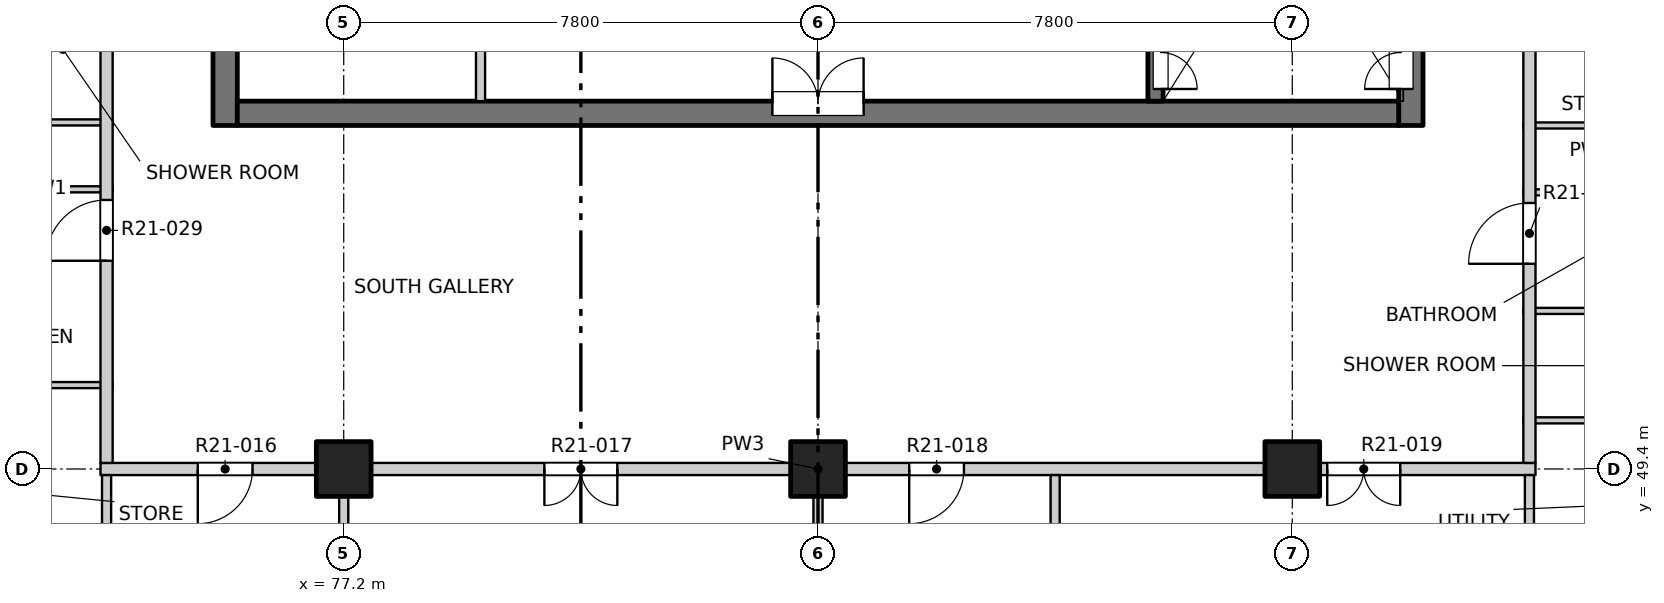
"""IFC4 building model, lengths in metres.
Left out: names, types, materials, properties, quantities, classifications, styles, units other than length and angle.
Written with IfcOpenShell. Run it as: python <this file> out.ifc"""

import sys

from ifc_helpers import new_model, si_unit, direction, frame, frame_2d, origin, origin_2d, place, context, subcontext, project, spatial, rectangle, extrude, element, fill, save


model = new_model("IFC4")
c1 = context("Model", 3, precision=1e-05, world=origin(), true_north=direction((0.0, 1.0)))
c2 = subcontext(c1, "Body", "Model", "MODEL_VIEW")
j1 = project(units=[si_unit("LENGTHUNIT", "METRE"), si_unit("PLANEANGLEUNIT", "RADIAN")], contexts=[c1])
p1 = place(None, origin())
s1 = spatial("IfcSite", under=j1, at=p1, CompositionType="ELEMENT")
p2 = place(p1, origin())
s2 = spatial("IfcBuilding", under=s1, at=p2, CompositionType="ELEMENT")
p3 = place(p2, frame((0.0, 0.0, 214.3)))
s3 = spatial("IfcBuildingStorey", under=s2, at=p3, CompositionType="ELEMENT", Elevation=214.3)
for number, where, z_axis, x_axis in (
    (1, (77.2, 49.4, -0.25), (0.0, 0.0, 1.0), (1.0, 0.0, 0.0)),
    (2, (85.0, 49.4, -0.25), (0.0, 0.0, 1.0), (1.0, 0.0, 0.0)),
    (3, (92.8, 49.4, -0.25), (0.0, 0.0, 1.0), (1.0, 0.0, 0.0)),
):
    element("IfcColumn", number, at=place(p3, frame(where, z_axis=z_axis, x_axis=x_axis)), inside=s3, PredefinedType="COLUMN", context=c2, shape_type="SweptSolid", body=[
        extrude(rectangle(XDim=0.9, YDim=0.9, at=origin_2d()), origin(), (0.0, 0.0, 1.0), 3.4),
    ])
p4 = place(p3, frame((75.25, 55.05, -0.25), z_axis=(0.0, 0.0, 1.0), x_axis=(0.0, 1.0, 0.0)))
e4 = element("IfcWall", 4, at=p4, inside=s3, PredefinedType="SOLIDWALL", context=c2, shape_type="SweptSolid", body=[
    extrude(rectangle(XDim=22.25, YDim=0.4, at=frame_2d((11.125, 0.0))), origin(), (0.0, 0.0, 1.0), 3.4),
])
p5 = place(p4, frame((7.4, 0.0, 0.25)))
e5 = element("IfcOpeningElement", 5, at=p5, cuts=e4, PredefinedType="OPENING", context=c2, shape_type="SweptSolid", body=[
    extrude(rectangle(XDim=0.9, YDim=2.1, at=frame_2d((0.45, 1.05))), frame((0.0, 0.21, 0.0), z_axis=(0.0, -1.0, 0.0), x_axis=(1.0, 0.0, 0.0)), (0.0, 0.0, 1.0), 0.42),
])
p6 = place(p4, frame((13.7, 0.0, 0.25)))
e6 = element("IfcOpeningElement", 6, at=p6, cuts=e4, PredefinedType="OPENING", context=c2, shape_type="SweptSolid", body=[
    extrude(rectangle(XDim=0.9, YDim=2.1, at=frame_2d((0.45, 1.05))), frame((0.0, 0.21, 0.0), z_axis=(0.0, -1.0, 0.0), x_axis=(1.0, 0.0, 0.0)), (0.0, 0.0, 1.0), 0.42),
])
p7 = place(p4, frame((20.0, 0.0, 0.25)))
e7 = element("IfcOpeningElement", 7, at=p7, cuts=e4, PredefinedType="OPENING", context=c2, shape_type="SweptSolid", body=[
    extrude(rectangle(XDim=0.9, YDim=2.1, at=frame_2d((0.45, 1.05))), frame((0.0, 0.21, 0.0), z_axis=(0.0, -1.0, 0.0), x_axis=(1.0, 0.0, 0.0)), (0.0, 0.0, 1.0), 0.42),
])
p8 = place(p3, frame((94.75, 55.05, -0.25), z_axis=(0.0, 0.0, 1.0), x_axis=(0.0, 1.0, 0.0)))
e8 = element("IfcWall", 8, at=p8, inside=s3, PredefinedType="SOLIDWALL", context=c2, shape_type="SweptSolid", body=[
    extrude(rectangle(XDim=6.9, YDim=0.4, at=frame_2d((3.45, 0.0))), origin(), (0.0, 0.0, 1.0), 3.4),
])
p9 = place(p8, frame((0.6, 0.0, 0.25)))
e9 = element("IfcOpeningElement", 9, at=p9, cuts=e8, PredefinedType="OPENING", context=c2, shape_type="SweptSolid", body=[
    extrude(rectangle(XDim=1.2, YDim=2.1, at=frame_2d((0.6, 1.05))), frame((0.0, 0.21, 0.0), z_axis=(0.0, -1.0, 0.0), x_axis=(1.0, 0.0, 0.0)), (0.0, 0.0, 1.0), 0.42),
])
p10 = place(p3, frame((75.45, 55.25, -0.25), z_axis=(0.0, 0.0, 1.0), x_axis=(1.0, 0.0, 0.0)))
e10 = element("IfcWall", 10, at=p10, inside=s3, PredefinedType="SOLIDWALL", context=c2, shape_type="SweptSolid", body=[
    extrude(rectangle(XDim=19.1, YDim=0.4, at=frame_2d((9.55, 0.0))), origin(), (0.0, 0.0, 1.0), 3.4),
])
p11 = place(p10, frame((8.8, 0.0, 0.25)))
e11 = element("IfcOpeningElement", 11, at=p11, cuts=e10, PredefinedType="OPENING", context=c2, shape_type="SweptSolid", body=[
    extrude(rectangle(XDim=1.5, YDim=2.1, at=frame_2d((0.75, 1.05))), frame((0.0, 0.21, 0.0), z_axis=(0.0, -1.0, 0.0), x_axis=(1.0, 0.0, 0.0)), (0.0, 0.0, 1.0), 0.42),
])
p12 = place(p3, frame((90.55, 55.45, -0.25), z_axis=(0.0, 0.0, 1.0), x_axis=(0.0, 1.0, 0.0)))
e12 = element("IfcWall", 12, at=p12, inside=s3, PredefinedType="SOLIDWALL", context=c2, shape_type="SweptSolid", body=[
    extrude(rectangle(XDim=6.5, YDim=0.25, at=frame_2d((3.25, 0.0))), origin(), (0.0, 0.0, 1.0), 3.4),
])
p13 = place(p12, frame((0.2, 0.0, 0.25)))
e13 = element("IfcOpeningElement", 13, at=p13, cuts=e12, PredefinedType="OPENING", context=c2, shape_type="SweptSolid", body=[
    extrude(rectangle(XDim=1.2, YDim=2.1, at=frame_2d((0.6, 1.05))), frame((0.0, 0.135, 0.0), z_axis=(0.0, -1.0, 0.0), x_axis=(1.0, 0.0, 0.0)), (0.0, 0.0, 1.0), 0.27),
])
p14 = place(p3, frame((73.2, 49.4, 0.0), z_axis=(0.0, 0.0, 1.0), x_axis=(1.0, 0.0, 0.0)))
e14 = element("IfcWall", 14, at=p14, inside=s3, PredefinedType="PARTITIONING", context=c2, shape_type="SweptSolid", body=[
    extrude(rectangle(XDim=23.6, YDim=0.2, at=frame_2d((11.8, 0.0))), origin(), (0.0, 0.0, 1.0), 3.15),
])
p15 = place(p14, frame((1.6, 0.0, 0.0)))
e15 = element("IfcOpeningElement", 15, at=p15, cuts=e14, PredefinedType="OPENING", context=c2, shape_type="SweptSolid", body=[
    extrude(rectangle(XDim=0.9, YDim=2.1, at=frame_2d((0.45, 1.05))), frame((0.0, 0.11, 0.0), z_axis=(0.0, -1.0, 0.0), x_axis=(1.0, 0.0, 0.0)), (0.0, 0.0, 1.0), 0.22),
])
p16 = place(p14, frame((7.3, 0.0, 0.0)))
e16 = element("IfcOpeningElement", 16, at=p16, cuts=e14, PredefinedType="OPENING", context=c2, shape_type="SweptSolid", body=[
    extrude(rectangle(XDim=1.2, YDim=2.1, at=frame_2d((0.6, 1.05))), frame((0.0, 0.11, 0.0), z_axis=(0.0, -1.0, 0.0), x_axis=(1.0, 0.0, 0.0)), (0.0, 0.0, 1.0), 0.22),
])
p17 = place(p14, frame((13.3, 0.0, 0.0)))
e17 = element("IfcOpeningElement", 17, at=p17, cuts=e14, PredefinedType="OPENING", context=c2, shape_type="SweptSolid", body=[
    extrude(rectangle(XDim=0.9, YDim=2.1, at=frame_2d((0.45, 1.05))), frame((0.0, 0.11, 0.0), z_axis=(0.0, -1.0, 0.0), x_axis=(1.0, 0.0, 0.0)), (0.0, 0.0, 1.0), 0.22),
])
p18 = place(p14, frame((20.175, 0.0, 0.0)))
e18 = element("IfcOpeningElement", 18, at=p18, cuts=e14, PredefinedType="OPENING", context=c2, shape_type="SweptSolid", body=[
    extrude(rectangle(XDim=1.2, YDim=2.1, at=frame_2d((0.6, 1.05))), frame((0.0, 0.11, 0.0), z_axis=(0.0, -1.0, 0.0), x_axis=(1.0, 0.0, 0.0)), (0.0, 0.0, 1.0), 0.22),
])
for number, where, z_axis, x_axis in (
    (19, (96.6, 50.2, 0.0), (0.0, 0.0, 1.0), (1.0, 0.0, 0.0)),
    (20, (71.18, 50.78, 0.0), (0.0, 0.0, 1.0), (1.0, 0.0, 0.0)),
    (21, (96.6, 52.0, 0.0), (0.0, 0.0, 1.0), (1.0, 0.0, 0.0)),
    (22, (96.6, 53.95, 0.0), (0.0, 0.0, 1.0), (1.0, 0.0, 0.0)),
    (23, (71.18, 54.0, 0.0), (0.0, 0.0, 1.0), (1.0, 0.0, 0.0)),
    (24, (96.6, 55.05, 0.0), (0.0, 0.0, 1.0), (1.0, 0.0, 0.0)),
    (25, (71.18, 55.1, 0.0), (0.0, 0.0, 1.0), (1.0, 0.0, 0.0)),
):
    element("IfcWall", number, at=place(p3, frame(where, z_axis=z_axis, x_axis=x_axis)), inside=s3, PredefinedType="PARTITIONING", context=c2, shape_type="SweptSolid", body=[
        extrude(rectangle(XDim=2.22, YDim=0.1, at=frame_2d((1.11, 0.0))), origin(), (0.0, 0.0, 1.0), 3.15),
    ])
p19 = place(p3, frame((73.3, 41.9, 0.0), z_axis=(0.0, 0.0, 1.0), x_axis=(0.0, 1.0, 0.0)))
e26 = element("IfcWall", 26, at=p19, inside=s3, PredefinedType="PARTITIONING", context=c2, shape_type="SweptSolid", body=[
    extrude(rectangle(XDim=7.4, YDim=0.15, at=frame_2d((3.7, 0.0))), origin(), (0.0, 0.0, 1.0), 3.15),
])
p20 = place(p3, frame((73.3, 49.5, 0.0), z_axis=(0.0, 0.0, 1.0), x_axis=(0.0, 1.0, 0.0)))
e27 = element("IfcWall", 27, at=p20, inside=s3, PredefinedType="PARTITIONING", context=c2, shape_type="SweptSolid", body=[
    extrude(rectangle(XDim=34.9, YDim=0.2, at=frame_2d((17.45, 0.0))), origin(), (0.0, 0.0, 1.0), 3.15),
])
p21 = place(p20, frame((3.325, 0.0, 0.0)))
e28 = element("IfcOpeningElement", 28, at=p21, cuts=e27, PredefinedType="OPENING", context=c2, shape_type="SweptSolid", body=[
    extrude(rectangle(XDim=1.0, YDim=2.1, at=frame_2d((0.5, 1.05))), frame((0.0, 0.11, 0.0), z_axis=(0.0, -1.0, 0.0), x_axis=(1.0, 0.0, 0.0)), (0.0, 0.0, 1.0), 0.22),
])
p22 = place(p20, frame((18.875, 0.0, 0.0)))
e29 = element("IfcOpeningElement", 29, at=p22, cuts=e27, PredefinedType="OPENING", context=c2, shape_type="SweptSolid", body=[
    extrude(rectangle(XDim=1.0, YDim=2.1, at=frame_2d((0.5, 1.05))), frame((0.0, 0.11, 0.0), z_axis=(0.0, -1.0, 0.0), x_axis=(1.0, 0.0, 0.0)), (0.0, 0.0, 1.0), 0.22),
])
p23 = place(p20, frame((29.325, 0.0, 0.0)))
e30 = element("IfcOpeningElement", 30, at=p23, cuts=e27, PredefinedType="OPENING", context=c2, shape_type="SweptSolid", body=[
    extrude(rectangle(XDim=1.0, YDim=2.1, at=frame_2d((0.5, 1.05))), frame((0.0, 0.11, 0.0), z_axis=(0.0, -1.0, 0.0), x_axis=(1.0, 0.0, 0.0)), (0.0, 0.0, 1.0), 0.22),
])
p24 = place(p3, frame((77.2, 41.9, 0.0), z_axis=(0.0, 0.0, 1.0), x_axis=(0.0, 1.0, 0.0)))
e31 = element("IfcWall", 31, at=p24, inside=s3, PredefinedType="PARTITIONING", context=c2, shape_type="SweptSolid", body=[
    extrude(rectangle(XDim=7.4, YDim=0.15, at=frame_2d((3.7, 0.0))), origin(), (0.0, 0.0, 1.0), 3.15),
])
p25 = place(p3, frame((79.45, 55.45, 0.0), z_axis=(0.0, 0.0, 1.0), x_axis=(0.0, 1.0, 0.0)))
e32 = element("IfcWall", 32, at=p25, inside=s3, PredefinedType="PARTITIONING", context=c2, shape_type="SweptSolid", body=[
    extrude(rectangle(XDim=5.45, YDim=0.15, at=frame_2d((2.725, 0.0))), origin(), (0.0, 0.0, 1.0), 3.15),
])
p26 = place(p25, frame((2.25, 0.0, 0.0)))
e33 = element("IfcOpeningElement", 33, at=p26, cuts=e32, PredefinedType="OPENING", context=c2, shape_type="SweptSolid", body=[
    extrude(rectangle(XDim=0.9, YDim=2.1, at=frame_2d((0.45, 1.05))), frame((0.0, 0.085, 0.0), z_axis=(0.0, -1.0, 0.0), x_axis=(1.0, 0.0, 0.0)), (0.0, 0.0, 1.0), 0.17),
])
p27 = place(p3, frame((85.0, 41.9, 0.0), z_axis=(0.0, 0.0, 1.0), x_axis=(0.0, 1.0, 0.0)))
e34 = element("IfcWall", 34, at=p27, inside=s3, PredefinedType="PARTITIONING", context=c2, shape_type="SweptSolid", body=[
    extrude(rectangle(XDim=7.4, YDim=0.15, at=frame_2d((3.7, 0.0))), origin(), (0.0, 0.0, 1.0), 3.15),
])
p28 = place(p3, frame((88.9, 41.9, 0.0), z_axis=(0.0, 0.0, 1.0), x_axis=(0.0, 1.0, 0.0)))
e35 = element("IfcWall", 35, at=p28, inside=s3, PredefinedType="PARTITIONING", context=c2, shape_type="SweptSolid", body=[
    extrude(rectangle(XDim=7.4, YDim=0.15, at=frame_2d((3.7, 0.0))), origin(), (0.0, 0.0, 1.0), 2.55),
])
p29 = place(p3, frame((96.7, 41.9, 0.0), z_axis=(0.0, 0.0, 1.0), x_axis=(0.0, 1.0, 0.0)))
e36 = element("IfcWall", 36, at=p29, inside=s3, PredefinedType="PARTITIONING", context=c2, shape_type="SweptSolid", body=[
    extrude(rectangle(XDim=7.4, YDim=0.15, at=frame_2d((3.7, 0.0))), origin(), (0.0, 0.0, 1.0), 3.15),
])
p30 = place(p3, frame((96.7, 49.5, 0.0), z_axis=(0.0, 0.0, 1.0), x_axis=(0.0, 1.0, 0.0)))
e37 = element("IfcWall", 37, at=p30, inside=s3, PredefinedType="PARTITIONING", context=c2, shape_type="SweptSolid", body=[
    extrude(rectangle(XDim=34.9, YDim=0.2, at=frame_2d((17.45, 0.0))), origin(), (0.0, 0.0, 1.0), 3.15),
])
p31 = place(p30, frame((3.275, 0.0, 0.0)))
e38 = element("IfcOpeningElement", 38, at=p31, cuts=e37, PredefinedType="OPENING", context=c2, shape_type="SweptSolid", body=[
    extrude(rectangle(XDim=1.0, YDim=2.1, at=frame_2d((0.5, 1.05))), frame((0.0, 0.11, 0.0), z_axis=(0.0, -1.0, 0.0), x_axis=(1.0, 0.0, 0.0)), (0.0, 0.0, 1.0), 0.22),
])
p32 = place(p30, frame((10.825, 0.0, 0.0)))
e39 = element("IfcOpeningElement", 39, at=p32, cuts=e37, PredefinedType="OPENING", context=c2, shape_type="SweptSolid", body=[
    extrude(rectangle(XDim=1.0, YDim=2.1, at=frame_2d((0.5, 1.05))), frame((0.0, 0.11, 0.0), z_axis=(0.0, -1.0, 0.0), x_axis=(1.0, 0.0, 0.0)), (0.0, 0.0, 1.0), 0.22),
])
p33 = place(p30, frame((21.575, 0.0, 0.0)))
e40 = element("IfcOpeningElement", 40, at=p33, cuts=e37, PredefinedType="OPENING", context=c2, shape_type="SweptSolid", body=[
    extrude(rectangle(XDim=1.0, YDim=2.1, at=frame_2d((0.5, 1.05))), frame((0.0, 0.11, 0.0), z_axis=(0.0, -1.0, 0.0), x_axis=(1.0, 0.0, 0.0)), (0.0, 0.0, 1.0), 0.22),
])
p34 = place(p30, frame((30.575, 0.0, 0.0)))
e41 = element("IfcOpeningElement", 41, at=p34, cuts=e37, PredefinedType="OPENING", context=c2, shape_type="SweptSolid", body=[
    extrude(rectangle(XDim=1.0, YDim=2.1, at=frame_2d((0.5, 1.05))), frame((0.0, 0.11, 0.0), z_axis=(0.0, -1.0, 0.0), x_axis=(1.0, 0.0, 0.0)), (0.0, 0.0, 1.0), 0.22),
])
p35 = place(p15, origin())
e42 = element("IfcDoor", 42, at=p35, inside=s3, OperationType="SINGLE_SWING_RIGHT", PredefinedType="DOOR", context=c2, shape_type="SweptSolid", body=[
    extrude(rectangle(XDim=0.9, YDim=2.1, at=frame_2d((0.45, 1.05))), frame((0.0, 0.025, 0.0), z_axis=(0.0, -1.0, 0.0), x_axis=(1.0, 0.0, 0.0)), (0.0, 0.0, 1.0), 0.05),
])
fill(e15, e42)
p36 = place(p16, origin())
e43 = element("IfcDoor", 43, at=p36, inside=s3, OperationType="DOUBLE_DOOR_SINGLE_SWING", PredefinedType="DOOR", context=c2, shape_type="SweptSolid", body=[
    extrude(rectangle(XDim=1.2, YDim=2.1, at=frame_2d((0.6, 1.05))), frame((0.0, 0.025, 0.0), z_axis=(0.0, -1.0, 0.0), x_axis=(1.0, 0.0, 0.0)), (0.0, 0.0, 1.0), 0.05),
])
fill(e16, e43)
p37 = place(p17, origin())
e44 = element("IfcDoor", 44, at=p37, inside=s3, OperationType="SINGLE_SWING_RIGHT", PredefinedType="DOOR", context=c2, shape_type="SweptSolid", body=[
    extrude(rectangle(XDim=0.9, YDim=2.1, at=frame_2d((0.45, 1.05))), frame((0.0, 0.025, 0.0), z_axis=(0.0, -1.0, 0.0), x_axis=(1.0, 0.0, 0.0)), (0.0, 0.0, 1.0), 0.05),
])
fill(e17, e44)
p38 = place(p18, origin())
e45 = element("IfcDoor", 45, at=p38, inside=s3, OperationType="DOUBLE_DOOR_SINGLE_SWING", PredefinedType="DOOR", context=c2, shape_type="SweptSolid", body=[
    extrude(rectangle(XDim=1.2, YDim=2.1, at=frame_2d((0.6, 1.05))), frame((0.0, 0.025, 0.0), z_axis=(0.0, -1.0, 0.0), x_axis=(1.0, 0.0, 0.0)), (0.0, 0.0, 1.0), 0.05),
])
fill(e18, e45)
p39 = place(p31, origin())
e46 = element("IfcDoor", 46, at=p39, inside=s3, OperationType="SINGLE_SWING_RIGHT", PredefinedType="DOOR", context=c2, shape_type="SweptSolid", body=[
    extrude(rectangle(XDim=1.0, YDim=2.1, at=frame_2d((0.5, 1.05))), frame((0.0, 0.025, 0.0), z_axis=(0.0, -1.0, 0.0), x_axis=(1.0, 0.0, 0.0)), (0.0, 0.0, 1.0), 0.05),
])
fill(e38, e46)
p40 = place(p21, origin())
e47 = element("IfcDoor", 47, at=p40, inside=s3, OperationType="SINGLE_SWING_LEFT", PredefinedType="DOOR", context=c2, shape_type="SweptSolid", body=[
    extrude(rectangle(XDim=1.0, YDim=2.1, at=frame_2d((0.5, 1.05))), frame((0.0, 0.025, 0.0), z_axis=(0.0, -1.0, 0.0), x_axis=(1.0, 0.0, 0.0)), (0.0, 0.0, 1.0), 0.05),
])
fill(e28, e47)
p41 = place(p11, origin())
e48 = element("IfcDoor", 48, at=p41, inside=s3, OperationType="DOUBLE_DOOR_SINGLE_SWING", PredefinedType="DOOR", context=c2, shape_type="SweptSolid", body=[
    extrude(rectangle(XDim=1.5, YDim=2.1, at=frame_2d((0.75, 1.05))), frame((0.0, 0.185, 0.0), z_axis=(0.0, -1.0, 0.0), x_axis=(1.0, 0.0, 0.0)), (0.0, 0.0, 1.0), 0.05),
])
fill(e11, e48)
p42 = place(p13, origin())
e49 = element("IfcDoor", 49, at=p42, inside=s3, OperationType="DOUBLE_DOOR_SINGLE_SWING", PredefinedType="DOOR", context=c2, shape_type="SweptSolid", body=[
    extrude(rectangle(XDim=1.2, YDim=2.1, at=frame_2d((0.6, 1.05))), frame((0.0, -0.06, 0.0), z_axis=(0.0, -1.0, 0.0), x_axis=(1.0, 0.0, 0.0)), (0.0, 0.0, 1.0), 0.05),
])
fill(e13, e49)
p43 = place(p9, origin())
e50 = element("IfcDoor", 50, at=p43, inside=s3, OperationType="DOUBLE_DOOR_SINGLE_SWING", PredefinedType="DOOR", context=c2, shape_type="SweptSolid", body=[
    extrude(rectangle(XDim=1.2, YDim=2.1, at=frame_2d((0.6, 1.05))), frame((0.0, 0.185, 0.0), z_axis=(0.0, -1.0, 0.0), x_axis=(1.0, 0.0, 0.0)), (0.0, 0.0, 1.0), 0.05),
])
fill(e9, e50)
save(model, sys.argv[1])
